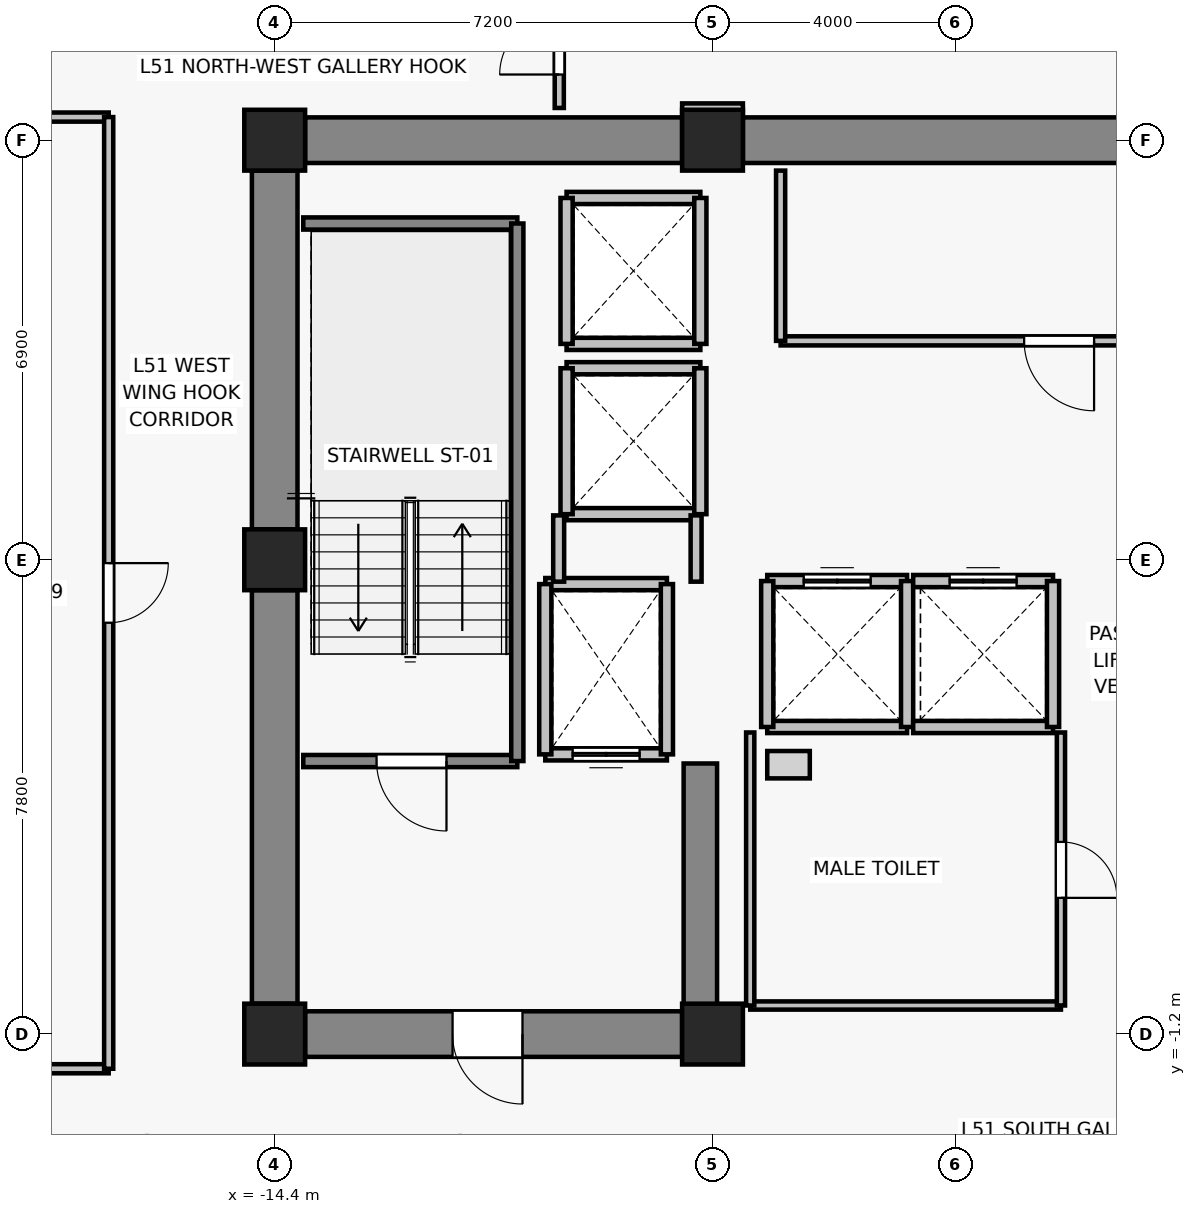
"""IFC4 building model, lengths in metres.
Left out: names, types, materials, properties, quantities, classifications, styles, units other than length and angle.
Written with IfcOpenShell. Run it as: python <this file> out.ifc"""

import sys

from ifc_helpers import new_model, si_unit, direction, frame, frame_2d, origin, origin_2d, place, context, subcontext, project, spatial, rectangle, extrude, source, transform, mapped, element, fill, save


model = new_model("IFC4")
c1 = context("Model", 3, precision=1e-05, world=origin(), true_north=direction((0.0, 1.0)))
c2 = subcontext(c1, "Body", "Model", "MODEL_VIEW")
j1 = project(units=[si_unit("LENGTHUNIT", "METRE"), si_unit("PLANEANGLEUNIT", "RADIAN")], contexts=[c1])
p1 = place(None, origin())
s1 = spatial("IfcSite", under=j1, at=p1, CompositionType="ELEMENT")
p2 = place(p1, origin())
s2 = spatial("IfcBuilding", under=s1, at=p2, CompositionType="ELEMENT")
p3 = place(p2, frame((0.0, 0.0, 182.5)))
s3 = spatial("IfcBuildingStorey", under=s2, at=p3, CompositionType="ELEMENT", Elevation=182.5)
for number, where, z_axis, x_axis in (
    (1, (-14.4, -1.2, 0.0), (0.0, 0.0, 1.0), (1.0, 0.0, 0.0)),
    (2, (-7.2, -1.2, 0.0), (0.0, 0.0, 1.0), (1.0, 0.0, 0.0)),
    (3, (-14.4, 6.6, 0.0), (0.0, 0.0, 1.0), (1.0, 0.0, 0.0)),
    (4, (-14.4, 13.5, 0.0), (0.0, 0.0, 1.0), (1.0, 0.0, 0.0)),
    (5, (-7.2, 13.5, 0.0), (0.0, 0.0, 1.0), (1.0, 0.0, 0.0)),
):
    element("IfcColumn", number, at=place(p3, frame(where, z_axis=z_axis, x_axis=x_axis)), inside=s3, PredefinedType="COLUMN", context=c2, shape_type="SweptSolid", body=[
        extrude(rectangle(XDim=1.0, YDim=1.0, at=origin_2d()), origin(), (0.0, 0.0, 1.0), 3.3),
    ])
p4 = place(p3, frame((-13.9, 13.5, 0.0), z_axis=(0.0, 0.0, 1.0), x_axis=(1.0, 0.0, 0.0)))
e6 = element("IfcWall", 6, at=p4, inside=s3, PredefinedType="SHEAR", context=c2, shape_type="SweptSolid", body=[
    extrude(rectangle(XDim=6.2, YDim=0.75, at=frame_2d((3.1, 0.0))), origin(), (0.0, 0.0, 1.0), 3.075),
])
p5 = place(p3, frame((-6.7, 13.5, 0.0), z_axis=(0.0, 0.0, 1.0), x_axis=(1.0, 0.0, 0.0)))
e7 = element("IfcWall", 7, at=p5, inside=s3, PredefinedType="SHEAR", context=c2, shape_type="SweptSolid", body=[
    extrude(rectangle(XDim=13.4, YDim=0.75, at=frame_2d((6.7, 0.0))), origin(), (0.0, 0.0, 1.0), 3.075),
])
p6 = place(p3, frame((-14.4, -0.7, 0.0), z_axis=(0.0, 0.0, 1.0), x_axis=(0.0, 1.0, 0.0)))
e8 = element("IfcWall", 8, at=p6, inside=s3, PredefinedType="SHEAR", context=c2, shape_type="SweptSolid", body=[
    extrude(rectangle(XDim=6.8, YDim=0.75, at=frame_2d((3.4, 0.0))), origin(), (0.0, 0.0, 1.0), 3.075),
])
p7 = place(p3, frame((-14.4, 7.1, 0.0), z_axis=(0.0, 0.0, 1.0), x_axis=(0.0, 1.0, 0.0)))
e9 = element("IfcWall", 9, at=p7, inside=s3, PredefinedType="SHEAR", context=c2, shape_type="SweptSolid", body=[
    extrude(rectangle(XDim=5.9, YDim=0.75, at=frame_2d((2.95, 0.0))), origin(), (0.0, 0.0, 1.0), 3.075),
])
p8 = place(p3, frame((-7.7, -1.2, 0.0), z_axis=(0.0, 0.0, 1.0), x_axis=(-1.0, 0.0, 0.0)))
e10 = element("IfcWall", 10, at=p8, inside=s3, PredefinedType="SHEAR", context=c2, shape_type="SweptSolid", body=[
    extrude(rectangle(XDim=6.2, YDim=0.75, at=frame_2d((3.1, 0.0))), origin(), (0.0, 0.0, 1.0), 3.075),
])
p9 = place(p8, frame((2.625, 0.0, 0.0)))
e11 = element("IfcOpeningElement", 11, at=p9, cuts=e10, PredefinedType="OPENING", context=c2, shape_type="SweptSolid", body=[
    extrude(rectangle(XDim=1.15, YDim=2.15, at=frame_2d((0.575, 1.075))), frame((0.0, 0.385, 0.0), z_axis=(0.0, -1.0, 0.0), x_axis=(1.0, 0.0, 0.0)), (0.0, 0.0, 1.0), 0.77),
])
p10 = place(p3, frame((-7.4, -0.825, 0.0), z_axis=(0.0, 0.0, 1.0), x_axis=(0.0, 1.0, 0.0)))
e12 = element("IfcWall", 12, at=p10, inside=s3, PredefinedType="SHEAR", context=c2, shape_type="SweptSolid", body=[
    extrude(rectangle(XDim=4.075, YDim=0.55, at=frame_2d((2.038, 0.0))), origin(), (0.0, 0.0, 1.0), 3.075),
])
p11 = place(p3, frame((-7.95, 3.4, 0.0), z_axis=(0.0, 0.0, 1.0), x_axis=(-1.0, 0.0, 0.0)))
e13 = element("IfcWall", 13, at=p11, inside=s3, PredefinedType="SOLIDWALL", context=c2, shape_type="SweptSolid", body=[
    extrude(rectangle(XDim=2.0, YDim=0.2, at=frame_2d((1.0, 0.0))), origin(), (0.0, 0.0, 1.0), 3.075),
])
p12 = place(p11, frame((0.45, 0.0, 0.0)))
e14 = element("IfcOpeningElement", 14, at=p12, cuts=e13, PredefinedType="OPENING", context=c2, shape_type="SweptSolid", body=[
    extrude(rectangle(XDim=1.1, YDim=2.2, at=frame_2d((0.55, 1.1))), frame((0.0, 0.11, 0.0), z_axis=(0.0, -1.0, 0.0), x_axis=(1.0, 0.0, 0.0)), (0.0, 0.0, 1.0), 0.22),
])
p13 = place(p3, frame((-9.95, 6.2, 0.0), z_axis=(0.0, 0.0, 1.0), x_axis=(1.0, 0.0, 0.0)))
e15 = element("IfcWall", 15, at=p13, inside=s3, PredefinedType="SOLIDWALL", context=c2, shape_type="SweptSolid", body=[
    extrude(rectangle(XDim=2.0, YDim=0.2, at=frame_2d((1.0, 0.0))), origin(), (0.0, 0.0, 1.0), 3.075),
])
for number, where, z_axis, x_axis in (
    (16, (-9.95, 3.4, 0.0), (0.0, 0.0, 1.0), (0.0, 1.0, 0.0)),
    (17, (-7.95, 6.2, 0.0), (0.0, 0.0, 1.0), (0.0, -1.0, 0.0)),
):
    element("IfcWall", number, at=place(p3, frame(where, z_axis=z_axis, x_axis=x_axis)), inside=s3, PredefinedType="SOLIDWALL", context=c2, shape_type="SweptSolid", body=[
        extrude(rectangle(XDim=2.8, YDim=0.2, at=frame_2d((1.4, 0.0))), origin(), (0.0, 0.0, 1.0), 3.075),
    ])
p14 = place(p3, frame((-4.0, 3.85, 0.0), z_axis=(0.0, 0.0, 1.0), x_axis=(-1.0, 0.0, 0.0)))
e18 = element("IfcWall", 18, at=p14, inside=s3, PredefinedType="SOLIDWALL", context=c2, shape_type="SweptSolid", body=[
    extrude(rectangle(XDim=2.3, YDim=0.2, at=frame_2d((1.15, 0.0))), origin(), (0.0, 0.0, 1.0), 3.075),
])
p15 = place(p3, frame((-6.3, 6.25, 0.0), z_axis=(0.0, 0.0, 1.0), x_axis=(1.0, 0.0, 0.0)))
e19 = element("IfcWall", 19, at=p15, inside=s3, PredefinedType="SOLIDWALL", context=c2, shape_type="SweptSolid", body=[
    extrude(rectangle(XDim=2.3, YDim=0.2, at=frame_2d((1.15, 0.0))), origin(), (0.0, 0.0, 1.0), 3.075),
])
p16 = place(p15, frame((0.6, 0.0, 0.0)))
e20 = element("IfcOpeningElement", 20, at=p16, cuts=e19, PredefinedType="OPENING", context=c2, shape_type="SweptSolid", body=[
    extrude(rectangle(XDim=1.1, YDim=2.2, at=frame_2d((0.55, 1.1))), frame((0.0, 0.11, 0.0), z_axis=(0.0, -1.0, 0.0), x_axis=(1.0, 0.0, 0.0)), (0.0, 0.0, 1.0), 0.22),
])
for number, where, z_axis, x_axis in (
    (21, (-6.3, 3.85, 0.0), (0.0, 0.0, 1.0), (0.0, 1.0, 0.0)),
    (22, (-4.0, 6.25, 0.0), (0.0, 0.0, 1.0), (0.0, -1.0, 0.0)),
):
    element("IfcWall", number, at=place(p3, frame(where, z_axis=z_axis, x_axis=x_axis)), inside=s3, PredefinedType="SOLIDWALL", context=c2, shape_type="SweptSolid", body=[
        extrude(rectangle(XDim=2.4, YDim=0.2, at=frame_2d((1.2, 0.0))), origin(), (0.0, 0.0, 1.0), 3.075),
    ])
p17 = place(p3, frame((-1.6, 3.85, 0.0), z_axis=(0.0, 0.0, 1.0), x_axis=(-1.0, 0.0, 0.0)))
e23 = element("IfcWall", 23, at=p17, inside=s3, PredefinedType="SOLIDWALL", context=c2, shape_type="SweptSolid", body=[
    extrude(rectangle(XDim=2.3, YDim=0.2, at=frame_2d((1.15, 0.0))), origin(), (0.0, 0.0, 1.0), 3.075),
])
p18 = place(p3, frame((-3.9, 6.25, 0.0), z_axis=(0.0, 0.0, 1.0), x_axis=(1.0, 0.0, 0.0)))
e24 = element("IfcWall", 24, at=p18, inside=s3, PredefinedType="SOLIDWALL", context=c2, shape_type="SweptSolid", body=[
    extrude(rectangle(XDim=2.3, YDim=0.2, at=frame_2d((1.15, 0.0))), origin(), (0.0, 0.0, 1.0), 3.075),
])
p19 = place(p18, frame((0.6, 0.0, 0.0)))
e25 = element("IfcOpeningElement", 25, at=p19, cuts=e24, PredefinedType="OPENING", context=c2, shape_type="SweptSolid", body=[
    extrude(rectangle(XDim=1.1, YDim=2.2, at=frame_2d((0.55, 1.1))), frame((0.0, 0.11, 0.0), z_axis=(0.0, -1.0, 0.0), x_axis=(1.0, 0.0, 0.0)), (0.0, 0.0, 1.0), 0.22),
])
p20 = place(p3, frame((-1.6, 6.25, 0.0), z_axis=(0.0, 0.0, 1.0), x_axis=(0.0, -1.0, 0.0)))
e26 = element("IfcWall", 26, at=p20, inside=s3, PredefinedType="SOLIDWALL", context=c2, shape_type="SweptSolid", body=[
    extrude(rectangle(XDim=2.4, YDim=0.2, at=frame_2d((1.2, 0.0))), origin(), (0.0, 0.0, 1.0), 3.075),
])
for number, where, z_axis, x_axis in (
    (27, (-7.4, 7.35, 0.0), (0.0, 0.0, 1.0), (-1.0, 0.0, 0.0)),
    (28, (-9.6, 9.75, 0.0), (0.0, 0.0, 1.0), (1.0, 0.0, 0.0)),
):
    element("IfcWall", number, at=place(p3, frame(where, z_axis=z_axis, x_axis=x_axis)), inside=s3, PredefinedType="SOLIDWALL", context=c2, shape_type="SweptSolid", body=[
        extrude(rectangle(XDim=2.2, YDim=0.2, at=frame_2d((1.1, 0.0))), origin(), (0.0, 0.0, 1.0), 2.565),
    ])
p21 = place(p3, frame((-9.6, 7.35, 0.0), z_axis=(0.0, 0.0, 1.0), x_axis=(0.0, 1.0, 0.0)))
e29 = element("IfcWall", 29, at=p21, inside=s3, PredefinedType="SOLIDWALL", context=c2, shape_type="SweptSolid", body=[
    extrude(rectangle(XDim=2.4, YDim=0.2, at=frame_2d((1.2, 0.0))), origin(), (0.0, 0.0, 1.0), 3.075),
])
p22 = place(p3, frame((-7.4, 9.75, 0.0), z_axis=(0.0, 0.0, 1.0), x_axis=(0.0, -1.0, 0.0)))
e30 = element("IfcWall", 30, at=p22, inside=s3, PredefinedType="SOLIDWALL", context=c2, shape_type="SweptSolid", body=[
    extrude(rectangle(XDim=2.4, YDim=0.2, at=frame_2d((1.2, 0.0))), origin(), (0.0, 0.0, 1.0), 2.565),
])
for number, where, z_axis, x_axis in (
    (31, (-7.4, 10.15, 0.0), (0.0, 0.0, 1.0), (-1.0, 0.0, 0.0)),
    (32, (-9.6, 12.55, 0.0), (0.0, 0.0, 1.0), (1.0, 0.0, 0.0)),
):
    element("IfcWall", number, at=place(p3, frame(where, z_axis=z_axis, x_axis=x_axis)), inside=s3, PredefinedType="SOLIDWALL", context=c2, shape_type="SweptSolid", body=[
        extrude(rectangle(XDim=2.2, YDim=0.2, at=frame_2d((1.1, 0.0))), origin(), (0.0, 0.0, 1.0), 2.565),
    ])
p23 = place(p3, frame((-9.6, 10.15, 0.0), z_axis=(0.0, 0.0, 1.0), x_axis=(0.0, 1.0, 0.0)))
e33 = element("IfcWall", 33, at=p23, inside=s3, PredefinedType="SOLIDWALL", context=c2, shape_type="SweptSolid", body=[
    extrude(rectangle(XDim=2.4, YDim=0.2, at=frame_2d((1.2, 0.0))), origin(), (0.0, 0.0, 1.0), 3.075),
])
p24 = place(p3, frame((-7.4, 12.55, 0.0), z_axis=(0.0, 0.0, 1.0), x_axis=(0.0, -1.0, 0.0)))
e34 = element("IfcWall", 34, at=p24, inside=s3, PredefinedType="SOLIDWALL", context=c2, shape_type="SweptSolid", body=[
    extrude(rectangle(XDim=2.4, YDim=0.2, at=frame_2d((1.2, 0.0))), origin(), (0.0, 0.0, 1.0), 2.565),
])
p25 = place(p3, frame((-10.41, 3.29, 0.0), z_axis=(0.0, 0.0, 1.0), x_axis=(-1.0, 0.0, 0.0)))
e35 = element("IfcWall", 35, at=p25, inside=s3, PredefinedType="SOLIDWALL", context=c2, shape_type="SweptSolid", body=[
    extrude(rectangle(XDim=3.52, YDim=0.2, at=frame_2d((1.76, 0.0))), origin(), (0.0, 0.0, 1.0), 3.075),
])
p26 = place(p25, frame((1.165, 0.0, 0.0)))
e36 = element("IfcOpeningElement", 36, at=p26, cuts=e35, PredefinedType="OPENING", context=c2, shape_type="SweptSolid", body=[
    extrude(rectangle(XDim=1.15, YDim=2.15, at=frame_2d((0.575, 1.075))), frame((0.0, 0.11, 0.0), z_axis=(0.0, -1.0, 0.0), x_axis=(1.0, 0.0, 0.0)), (0.0, 0.0, 1.0), 0.22),
])
p27 = place(p3, frame((-13.93, 12.13, 0.0), z_axis=(0.0, 0.0, 1.0), x_axis=(1.0, 0.0, 0.0)))
e37 = element("IfcWall", 37, at=p27, inside=s3, PredefinedType="SOLIDWALL", context=c2, shape_type="SweptSolid", body=[
    extrude(rectangle(XDim=3.52, YDim=0.2, at=frame_2d((1.76, 0.0))), origin(), (0.0, 0.0, 1.0), 3.075),
])
p28 = place(p3, frame((-10.41, 12.13, 0.0), z_axis=(0.0, 0.0, 1.0), x_axis=(0.0, -1.0, 0.0)))
e38 = element("IfcWall", 38, at=p28, inside=s3, PredefinedType="SOLIDWALL", context=c2, shape_type="SweptSolid", body=[
    extrude(rectangle(XDim=8.84, YDim=0.2, at=frame_2d((4.42, 0.0))), origin(), (0.0, 0.0, 1.0), 3.075),
])
p29 = place(p3, frame((-9.73, 6.24, 0.0), z_axis=(0.0, 0.0, 1.0), x_axis=(0.0, 1.0, 0.0)))
e39 = element("IfcWall", 39, at=p29, inside=s3, PredefinedType="PARTITIONING", context=c2, shape_type="SweptSolid", body=[
    extrude(rectangle(XDim=1.09, YDim=0.18, at=frame_2d((0.545, 0.0))), origin(), (0.0, 0.0, 1.0), 3.075),
])
p30 = place(p3, frame((-7.47, 7.33, 0.0), z_axis=(0.0, 0.0, 1.0), x_axis=(0.0, -1.0, 0.0)))
e40 = element("IfcWall", 40, at=p30, inside=s3, PredefinedType="PARTITIONING", context=c2, shape_type="SweptSolid", body=[
    extrude(rectangle(XDim=1.09, YDim=0.18, at=frame_2d((0.545, 0.0))), origin(), (0.0, 0.0, 1.0), 2.565),
])
p31 = place(p3, frame((6.08, 10.2, 0.0), z_axis=(0.0, 0.0, 1.0), x_axis=(-1.0, 0.0, 0.0)))
e41 = element("IfcWall", 41, at=p31, inside=s3, PredefinedType="PARTITIONING", context=c2, shape_type="SweptSolid", body=[
    extrude(rectangle(XDim=12.16, YDim=0.15, at=frame_2d((6.08, 0.0))), origin(), (0.0, 0.0, 1.0), 3.075),
])
p32 = place(p31, frame((7.005, 0.0, 0.0)))
e42 = element("IfcOpeningElement", 42, at=p32, cuts=e41, PredefinedType="OPENING", context=c2, shape_type="SweptSolid", body=[
    extrude(rectangle(XDim=1.15, YDim=2.15, at=frame_2d((0.575, 1.075))), frame((0.0, 0.085, 0.0), z_axis=(0.0, -1.0, 0.0), x_axis=(1.0, 0.0, 0.0)), (0.0, 0.0, 1.0), 0.17),
])
p33 = place(p3, frame((-6.08, 10.2, 0.0), z_axis=(0.0, 0.0, 1.0), x_axis=(0.0, 1.0, 0.0)))
e43 = element("IfcWall", 43, at=p33, inside=s3, PredefinedType="PARTITIONING", context=c2, shape_type="SweptSolid", body=[
    extrude(rectangle(XDim=2.8, YDim=0.15, at=frame_2d((1.4, 0.0))), origin(), (0.0, 0.0, 1.0), 3.075),
])
p34 = place(p3, frame((-1.47, -0.73, 0.0), z_axis=(0.0, 0.0, 1.0), x_axis=(-1.0, 0.0, 0.0)))
e44 = element("IfcWall", 44, at=p34, inside=s3, PredefinedType="PARTITIONING", context=c2, shape_type="SweptSolid", body=[
    extrude(rectangle(XDim=5.11, YDim=0.135, at=frame_2d((2.555, 0.0))), origin(), (0.0, 0.0, 1.0), 3.075),
])
p35 = place(p3, frame((-6.58, -0.73, 0.0), z_axis=(0.0, 0.0, 1.0), x_axis=(0.0, 1.0, 0.0)))
e45 = element("IfcWall", 45, at=p35, inside=s3, PredefinedType="PARTITIONING", context=c2, shape_type="SweptSolid", body=[
    extrude(rectangle(XDim=4.49, YDim=0.135, at=frame_2d((2.245, 0.0))), origin(), (0.0, 0.0, 1.0), 3.075),
])
p36 = place(p3, frame((-1.47, 3.76, 0.0), z_axis=(0.0, 0.0, 1.0), x_axis=(0.0, -1.0, 0.0)))
e46 = element("IfcWall", 46, at=p36, inside=s3, PredefinedType="PARTITIONING", context=c2, shape_type="SweptSolid", body=[
    extrude(rectangle(XDim=4.49, YDim=0.135, at=frame_2d((2.245, 0.0))), origin(), (0.0, 0.0, 1.0), 3.075),
])
p37 = place(p36, frame((1.8, 0.0, 0.0)))
e47 = element("IfcOpeningElement", 47, at=p37, cuts=e46, PredefinedType="OPENING", context=c2, shape_type="SweptSolid", body=[
    extrude(rectangle(XDim=0.92, YDim=2.1, at=frame_2d((0.46, 1.05))), frame((0.0, 0.077, 0.0), z_axis=(0.0, -1.0, 0.0), x_axis=(1.0, 0.0, 0.0)), (0.0, 0.0, 1.0), 0.155),
])
p38 = place(p3, frame((-17.13, -1.77, 0.0), z_axis=(0.0, 0.0, 1.0), x_axis=(-1.0, 0.0, 0.0)))
e48 = element("IfcWall", 48, at=p38, inside=s3, PredefinedType="PARTITIONING", context=c2, shape_type="SweptSolid", body=[
    extrude(rectangle(XDim=5.4, YDim=0.15, at=frame_2d((2.7, 0.0))), origin(), (0.0, 0.0, 1.0), 2.565),
])
p39 = place(p3, frame((-22.53, 13.88, 0.0), z_axis=(0.0, 0.0, 1.0), x_axis=(1.0, 0.0, 0.0)))
e49 = element("IfcWall", 49, at=p39, inside=s3, PredefinedType="PARTITIONING", context=c2, shape_type="SweptSolid", body=[
    extrude(rectangle(XDim=5.4, YDim=0.15, at=frame_2d((2.7, 0.0))), origin(), (0.0, 0.0, 1.0), 3.075),
])
p40 = place(p3, frame((-17.13, 13.88, 0.0), z_axis=(0.0, 0.0, 1.0), x_axis=(0.0, -1.0, 0.0)))
e50 = element("IfcWall", 50, at=p40, inside=s3, PredefinedType="PARTITIONING", context=c2, shape_type="SweptSolid", body=[
    extrude(rectangle(XDim=15.65, YDim=0.15, at=frame_2d((7.825, 0.0))), origin(), (0.0, 0.0, 1.0), 2.565),
])
p41 = place(p40, frame((7.335, 0.0, 0.0)))
e51 = element("IfcOpeningElement", 51, at=p41, cuts=e50, PredefinedType="OPENING", context=c2, shape_type="SweptSolid", body=[
    extrude(rectangle(XDim=0.98, YDim=2.15, at=frame_2d((0.49, 1.075))), frame((0.0, 0.085, 0.0), z_axis=(0.0, -1.0, 0.0), x_axis=(1.0, 0.0, 0.0)), (0.0, 0.0, 1.0), 0.17),
])
p42 = place(p3, frame((-6.7, 14.03, 0.0), z_axis=(0.0, 0.0, 1.0), x_axis=(-1.0, 0.0, 0.0)))
e52 = element("IfcWall", 52, at=p42, inside=s3, PredefinedType="PARTITIONING", context=c2, shape_type="SweptSolid", body=[
    extrude(rectangle(XDim=1.0, YDim=0.15, at=frame_2d((0.5, 0.0))), origin(), (0.0, 0.0, 1.0), 2.565),
])
p43 = place(p3, frame((-9.72, 14.03, 0.0), z_axis=(0.0, 0.0, 1.0), x_axis=(0.0, 1.0, 0.0)))
e53 = element("IfcWall", 53, at=p43, inside=s3, PredefinedType="PARTITIONING", context=c2, shape_type="SweptSolid", body=[
    extrude(rectangle(XDim=3.3, YDim=0.15, at=frame_2d((1.65, 0.0))), origin(), (0.0, 0.0, 1.0), 2.565),
])
p44 = place(p43, frame((0.55, 0.0, 0.0)))
e54 = element("IfcOpeningElement", 54, at=p44, cuts=e53, PredefinedType="OPENING", context=c2, shape_type="SweptSolid", body=[
    extrude(rectangle(XDim=0.98, YDim=2.15, at=frame_2d((0.49, 1.075))), frame((0.0, 0.085, 0.0), z_axis=(0.0, -1.0, 0.0), x_axis=(1.0, 0.0, 0.0)), (0.0, 0.0, 1.0), 0.17),
])
m1 = source(origin(), c2, "Body", "SweptSolid", [
    extrude(rectangle(XDim=1.1, YDim=2.2, at=frame_2d((0.55, 1.1))), frame((0.0, 0.025, 0.0), z_axis=(0.0, -1.0, 0.0), x_axis=(1.0, 0.0, 0.0)), (0.0, 0.0, 1.0), 0.05),
])
p45 = place(p12, origin())
e55 = element("IfcDoor", 55, at=p45, inside=s3, OperationType="DOUBLE_DOOR_SLIDING", PredefinedType="DOOR", context=c2, shape_type="MappedRepresentation", body=[
    mapped(m1, transform((0.0, 0.0, 0.0), x_axis=(1.0, 0.0, 0.0), y_axis=(0.0, 1.0, 0.0), z_axis=(0.0, 0.0, 1.0), scale=1.0)),
])
fill(e14, e55)
p46 = place(p16, origin())
e56 = element("IfcDoor", 56, at=p46, inside=s3, OperationType="DOUBLE_DOOR_SLIDING", PredefinedType="DOOR", context=c2, shape_type="MappedRepresentation", body=[
    mapped(m1, transform((0.0, 0.0, 0.0), x_axis=(1.0, 0.0, 0.0), y_axis=(0.0, 1.0, 0.0), z_axis=(0.0, 0.0, 1.0), scale=1.0)),
])
fill(e20, e56)
p47 = place(p19, origin())
e57 = element("IfcDoor", 57, at=p47, inside=s3, OperationType="DOUBLE_DOOR_SLIDING", PredefinedType="DOOR", context=c2, shape_type="MappedRepresentation", body=[
    mapped(m1, transform((0.0, 0.0, 0.0), x_axis=(1.0, 0.0, 0.0), y_axis=(0.0, 1.0, 0.0), z_axis=(0.0, 0.0, 1.0), scale=1.0)),
])
fill(e25, e57)
m2 = source(origin(), c2, "Body", "SweptSolid", [
    extrude(rectangle(XDim=1.15, YDim=2.15, at=frame_2d((0.575, 1.075))), frame((0.0, 0.025, 0.0), z_axis=(0.0, -1.0, 0.0), x_axis=(1.0, 0.0, 0.0)), (0.0, 0.0, 1.0), 0.05),
])
p48 = place(p26, origin())
e58 = element("IfcDoor", 58, at=p48, inside=s3, OperationType="SINGLE_SWING_LEFT", PredefinedType="DOOR", context=c2, shape_type="MappedRepresentation", body=[
    mapped(m2, transform((0.0, 0.0, 0.0), x_axis=(1.0, 0.0, 0.0), y_axis=(0.0, 1.0, 0.0), z_axis=(0.0, 0.0, 1.0), scale=1.0)),
])
fill(e36, e58)
p49 = place(p9, origin())
e59 = element("IfcDoor", 59, at=p49, inside=s3, OperationType="SINGLE_SWING_LEFT", PredefinedType="DOOR", context=c2, shape_type="MappedRepresentation", body=[
    mapped(m2, transform((0.0, 0.0, 0.0), x_axis=(1.0, 0.0, 0.0), y_axis=(0.0, 1.0, 0.0), z_axis=(0.0, 0.0, 1.0), scale=1.0)),
])
fill(e11, e59)
p50 = place(p32, origin())
e60 = element("IfcDoor", 60, at=p50, inside=s3, OperationType="SINGLE_SWING_LEFT", PredefinedType="DOOR", context=c2, shape_type="MappedRepresentation", body=[
    mapped(m2, transform((0.0, 0.0, 0.0), x_axis=(1.0, 0.0, 0.0), y_axis=(0.0, 1.0, 0.0), z_axis=(0.0, 0.0, 1.0), scale=1.0)),
])
fill(e42, e60)
m3 = source(origin(), c2, "Body", "SweptSolid", [
    extrude(rectangle(XDim=0.92, YDim=2.1, at=frame_2d((0.46, 1.05))), frame((0.0, 0.025, 0.0), z_axis=(0.0, -1.0, 0.0), x_axis=(1.0, 0.0, 0.0)), (0.0, 0.0, 1.0), 0.05),
])
p51 = place(p37, origin())
e61 = element("IfcDoor", 61, at=p51, inside=s3, OperationType="SINGLE_SWING_RIGHT", PredefinedType="DOOR", context=c2, shape_type="MappedRepresentation", body=[
    mapped(m3, transform((0.0, 0.0, 0.0), x_axis=(1.0, 0.0, 0.0), y_axis=(0.0, 1.0, 0.0), z_axis=(0.0, 0.0, 1.0), scale=1.0)),
])
fill(e47, e61)
m4 = source(origin(), c2, "Body", "SweptSolid", [
    extrude(rectangle(XDim=0.98, YDim=2.15, at=frame_2d((0.49, 1.075))), frame((0.0, 0.025, 0.0), z_axis=(0.0, -1.0, 0.0), x_axis=(1.0, 0.0, 0.0)), (0.0, 0.0, 1.0), 0.05),
])
p52 = place(p41, origin())
e62 = element("IfcDoor", 62, at=p52, inside=s3, OperationType="SINGLE_SWING_LEFT", PredefinedType="DOOR", context=c2, shape_type="MappedRepresentation", body=[
    mapped(m4, transform((0.0, 0.0, 0.0), x_axis=(1.0, 0.0, 0.0), y_axis=(0.0, 1.0, 0.0), z_axis=(0.0, 0.0, 1.0), scale=1.0)),
])
fill(e51, e62)
p53 = place(p44, origin())
e63 = element("IfcDoor", 63, at=p53, inside=s3, OperationType="SINGLE_SWING_LEFT", PredefinedType="DOOR", context=c2, shape_type="MappedRepresentation", body=[
    mapped(m4, transform((0.0, 0.0, 0.0), x_axis=(1.0, 0.0, 0.0), y_axis=(0.0, 1.0, 0.0), z_axis=(0.0, 0.0, 1.0), scale=1.0)),
])
fill(e54, e63)
save(model, sys.argv[1])
